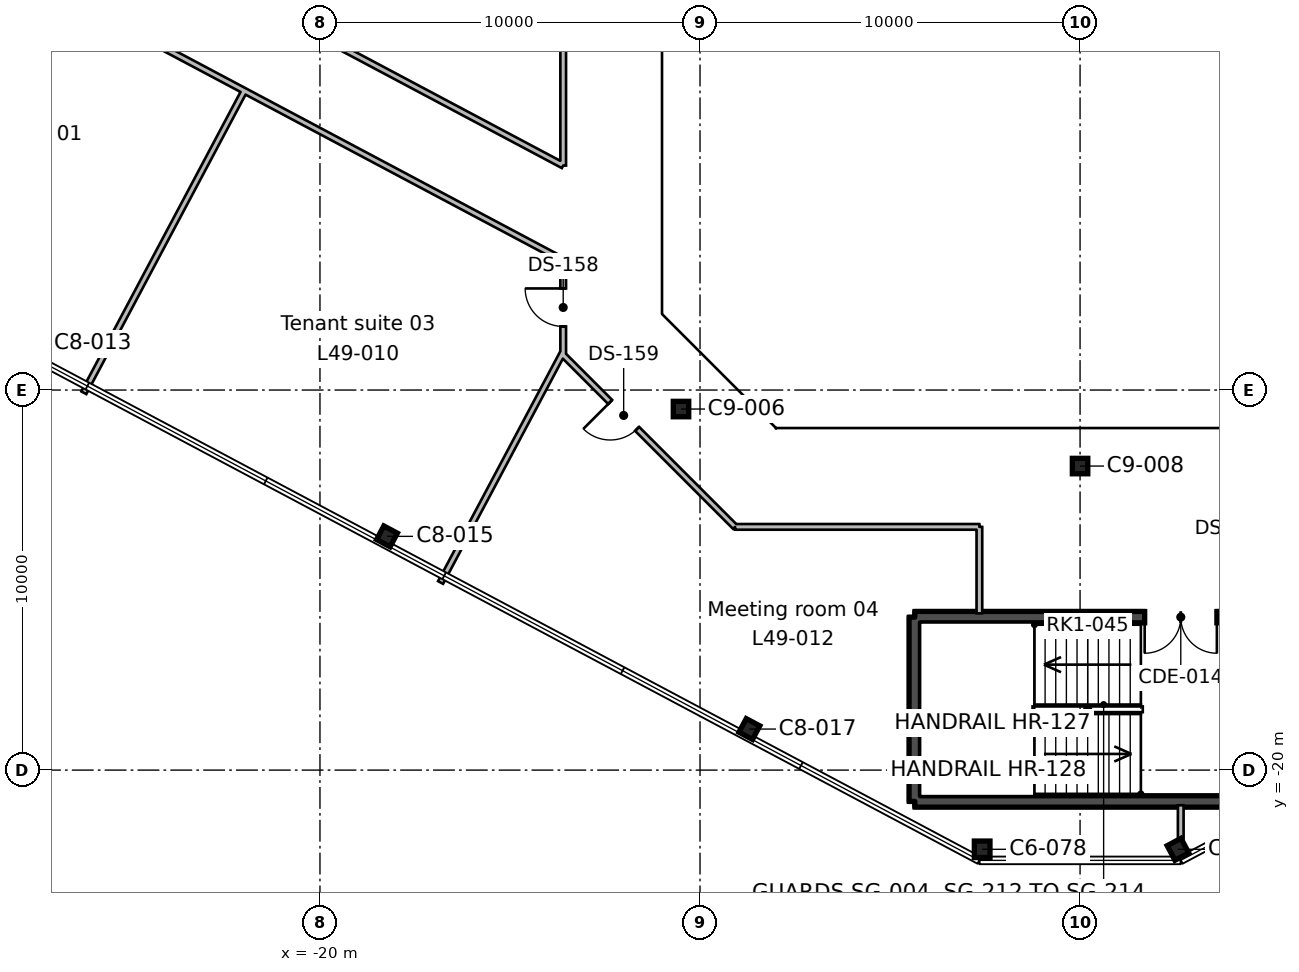
"""IFC4 building model, lengths in metres.
Left out: names, types, materials, properties, quantities, classifications, styles, units other than length and angle.
Written with IfcOpenShell. Run it as: python <this file> out.ifc"""

import sys

from ifc_helpers import new_model, si_unit, direction, frame, frame_2d, origin, origin_2d, place, context, subcontext, project, spatial, rectangle, hollow_rectangle, i_section, extrude, element, fill, save


model = new_model("IFC4")
c1 = context("Model", 3, precision=1e-05, world=origin(), true_north=direction((0.0, 1.0)))
c2 = subcontext(c1, "Body", "Model", "MODEL_VIEW")
j1 = project(units=[si_unit("LENGTHUNIT", "METRE"), si_unit("PLANEANGLEUNIT", "RADIAN")], contexts=[c1])
p1 = place(None, origin())
s1 = spatial("IfcSite", under=j1, at=p1, CompositionType="ELEMENT")
p2 = place(p1, origin())
s2 = spatial("IfcBuilding", under=s1, at=p2, CompositionType="ELEMENT")
p3 = place(p2, frame((0.0, 0.0, 224.7)))
s3 = spatial("IfcBuildingStorey", under=s2, at=p3, CompositionType="ELEMENT", Elevation=224.7)
for number, where, z_axis, x_axis in (
    (1, (-2.576, -22.084, 0.0), (0.0, 0.0, 1.0), (1.0, 0.0, 0.0)),
    (2, (2.576, -22.084, 0.0), (0.0, 0.0, 1.0), (0.883, 0.469, 0.0)),
):
    element("IfcColumn", number, at=place(p3, frame(where, z_axis=z_axis, x_axis=x_axis)), inside=s3, PredefinedType="COLUMN", context=c2, shape_type="SweptSolid", body=[
        extrude(i_section(OverallWidth=0.412, OverallDepth=0.434, WebThickness=0.036, FlangeThickness=0.057, FilletRadius=0.015, at=origin_2d()), origin(), (0.0, 0.0, 1.0), 3.9),
    ])
for number, where, z_axis, x_axis in (
    (3, (-8.701, -18.92, 0.0), (0.0, 0.0, 1.0), (0.883, -0.469, 0.0)),
    (4, (-18.237, -13.85, 0.0), (0.0, 0.0, 1.0), (0.883, -0.469, 0.0)),
):
    element("IfcColumn", number, at=place(p3, frame(where, z_axis=z_axis, x_axis=x_axis)), inside=s3, PredefinedType="COLUMN", context=c2, shape_type="SweptSolid", body=[
        extrude(i_section(OverallWidth=0.404, OverallDepth=0.406, WebThickness=0.027, FlangeThickness=0.044, FilletRadius=0.015, at=origin_2d()), origin(), (0.0, 0.0, 1.0), 3.9),
    ])
for number, where, z_axis, x_axis in (
    (5, (0.0, -12.0, 0.0), (0.0, 0.0, 1.0), (1.0, 0.0, 0.0)),
    (6, (-10.5, -10.5, 0.0), (0.0, 0.0, 1.0), (1.0, 0.0, 0.0)),
):
    element("IfcColumn", number, at=place(p3, frame(where, z_axis=z_axis, x_axis=x_axis)), inside=s3, PredefinedType="COLUMN", context=c2, shape_type="SweptSolid", body=[
        extrude(hollow_rectangle(XDim=0.406, YDim=0.406, WallThickness=0.015, InnerFilletRadius=0.007, OuterFilletRadius=0.022, at=origin_2d()), origin(), (0.0, 0.0, 1.0), 3.9),
    ])
p4 = place(p3, frame((3.95, -20.825, 0.0), z_axis=(0.0, 0.0, 1.0), x_axis=(-1.0, 0.0, 0.0)))
e7 = element("IfcWall", 7, at=p4, inside=s3, PredefinedType="SHEAR", context=c2, shape_type="SweptSolid", body=[
    extrude(rectangle(XDim=8.3, YDim=0.3, at=frame_2d((4.15, 0.0))), origin(), (0.0, 0.0, 1.0), 3.9),
])
p5 = place(p3, frame((-4.35, -20.825, 0.0), z_axis=(0.0, 0.0, 1.0), x_axis=(0.0, 1.0, 0.0)))
e8 = element("IfcWall", 8, at=p5, inside=s3, PredefinedType="SHEAR", context=c2, shape_type="SweptSolid", body=[
    extrude(rectangle(XDim=4.85, YDim=0.3, at=frame_2d((2.425, 0.0))), origin(), (0.0, 0.0, 1.0), 3.9),
])
p6 = place(p3, frame((-4.35, -15.975, 0.0), z_axis=(0.0, 0.0, 1.0), x_axis=(1.0, 0.0, 0.0)))
e9 = element("IfcWall", 9, at=p6, inside=s3, PredefinedType="SHEAR", context=c2, shape_type="SweptSolid", body=[
    extrude(rectangle(XDim=8.3, YDim=0.3, at=frame_2d((4.15, 0.0))), origin(), (0.0, 0.0, 1.0), 3.9),
])
p7 = place(p6, frame((6.05, 0.0, 0.0)))
e10 = element("IfcOpeningElement", 10, at=p7, cuts=e9, PredefinedType="OPENING", context=c2, shape_type="SweptSolid", body=[
    extrude(rectangle(XDim=1.9, YDim=2.1, at=frame_2d((0.95, 1.05))), frame((0.0, 0.16, 0.0), z_axis=(0.0, -1.0, 0.0), x_axis=(1.0, 0.0, 0.0)), (0.0, 0.0, 1.0), 0.32),
])
p8 = place(p3, frame((-13.6, -9.077, 0.0), z_axis=(0.0, 0.0, 1.0), x_axis=(0.0, 1.0, 0.0)))
e11 = element("IfcWall", 11, at=p8, inside=s3, PredefinedType="PARTITIONING", context=c2, shape_type="SweptSolid", body=[
    extrude(rectangle(XDim=2.491, YDim=0.15, at=frame_2d((1.246, 0.0))), origin(), (0.0, 0.0, 1.0), 3.54),
])
p9 = place(p8, frame((0.75, 0.0, 0.0)))
e12 = element("IfcOpeningElement", 12, at=p9, cuts=e11, PredefinedType="OPENING", context=c2, shape_type="SweptSolid", body=[
    extrude(rectangle(XDim=1.0, YDim=2.1, at=frame_2d((0.5, 1.05))), frame((0.0, 0.085, 0.0), z_axis=(0.0, -1.0, 0.0), x_axis=(1.0, 0.0, 0.0)), (0.0, 0.0, 1.0), 0.17),
])
p10 = place(p3, frame((-13.6, -6.586, 0.0), z_axis=(0.0, 0.0, 1.0), x_axis=(-0.882948083203, 0.469470640582, 0.0)))
e13 = element("IfcWall", 13, at=p10, inside=s3, PredefinedType="PARTITIONING", context=c2, shape_type="SweptSolid", body=[
    extrude(rectangle(XDim=36.556, YDim=0.15, at=frame_2d((18.278, 0.0))), origin(), (0.0, 0.0, 1.0), 3.54),
])
p11 = place(p10, frame((34.25, 0.0, 0.0)))
e14 = element("IfcOpeningElement", 14, at=p11, cuts=e13, PredefinedType="OPENING", context=c2, shape_type="SweptSolid", body=[
    extrude(rectangle(XDim=1.0, YDim=2.1, at=frame_2d((0.5, 1.05))), frame((0.0, 0.085, 0.0), z_axis=(0.0, -1.0, 0.0), x_axis=(1.0, 0.0, 0.0)), (0.0, 0.0, 1.0), 0.17),
])
p12 = place(p10, frame((25.65, 0.0, 0.0)))
e15 = element("IfcOpeningElement", 15, at=p12, cuts=e13, PredefinedType="OPENING", context=c2, shape_type="SweptSolid", body=[
    extrude(rectangle(XDim=1.0, YDim=2.1, at=frame_2d((0.5, 1.05))), frame((0.0, 0.085, 0.0), z_axis=(0.0, -1.0, 0.0), x_axis=(1.0, 0.0, 0.0)), (0.0, 0.0, 1.0), 0.17),
])
p13 = place(p10, frame((17.75, 0.0, 0.0)))
e16 = element("IfcOpeningElement", 16, at=p13, cuts=e13, PredefinedType="OPENING", context=c2, shape_type="SweptSolid", body=[
    extrude(rectangle(XDim=1.0, YDim=2.1, at=frame_2d((0.5, 1.05))), frame((0.0, 0.085, 0.0), z_axis=(0.0, -1.0, 0.0), x_axis=(1.0, 0.0, 0.0)), (0.0, 0.0, 1.0), 0.17),
])
p14 = place(p3, frame((-21.989, -2.126, 0.0), z_axis=(0.0, 0.0, 1.0), x_axis=(-0.469481145989, -0.882942497313, 0.0)))
e17 = element("IfcWall", 17, at=p14, inside=s3, PredefinedType="PARTITIONING", context=c2, shape_type="SweptSolid", body=[
    extrude(rectangle(XDim=9.0, YDim=0.15, at=frame_2d((4.5, 0.0))), origin(), (0.0, 0.0, 1.0), 3.54),
])
p15 = place(p3, frame((-13.6, -8.998, 0.0), z_axis=(0.0, 0.0, 1.0), x_axis=(-0.469531053644, -0.882915958438, 0.0)))
e18 = element("IfcWall", 18, at=p15, inside=s3, PredefinedType="PARTITIONING", context=c2, shape_type="SweptSolid", body=[
    extrude(rectangle(XDim=6.87, YDim=0.15, at=frame_2d((3.435, 0.0))), origin(), (0.0, 0.0, 1.0), 3.54),
])
p16 = place(p3, frame((-13.6, -9.077, 0.0), z_axis=(0.0, 0.0, 1.0), x_axis=(0.707106781187, -0.707106781187, 0.0)))
e19 = element("IfcWall", 19, at=p16, inside=s3, PredefinedType="PARTITIONING", context=c2, shape_type="SweptSolid", body=[
    extrude(rectangle(XDim=6.397, YDim=0.15, at=frame_2d((3.198, 0.0))), origin(), (0.0, 0.0, 1.0), 3.54),
])
p17 = place(p16, frame((1.75, 0.0, 0.0)))
e20 = element("IfcOpeningElement", 20, at=p17, cuts=e19, PredefinedType="OPENING", context=c2, shape_type="SweptSolid", body=[
    extrude(rectangle(XDim=1.0, YDim=2.1, at=frame_2d((0.5, 1.05))), frame((0.0, 0.085, 0.0), z_axis=(0.0, -1.0, 0.0), x_axis=(1.0, 0.0, 0.0)), (0.0, 0.0, 1.0), 0.17),
])
p18 = place(p3, frame((-2.649, -15.875, 0.0), z_axis=(0.0, 0.0, 1.0), x_axis=(0.0, 1.0, 0.0)))
e21 = element("IfcWall", 21, at=p18, inside=s3, PredefinedType="PARTITIONING", context=c2, shape_type="SweptSolid", body=[
    extrude(rectangle(XDim=2.275, YDim=0.15, at=frame_2d((1.137, 0.0))), origin(), (0.0, 0.0, 1.0), 3.54),
])
p19 = place(p3, frame((-2.649, -13.6, 0.0), z_axis=(0.0, 0.0, 1.0), x_axis=(-1.0, 0.0, 0.0)))
e22 = element("IfcWall", 22, at=p19, inside=s3, PredefinedType="PARTITIONING", context=c2, shape_type="SweptSolid", body=[
    extrude(rectangle(XDim=6.428, YDim=0.15, at=frame_2d((3.214, 0.0))), origin(), (0.0, 0.0, 1.0), 3.54),
])
p20 = place(p3, frame((2.649, -21.799, 0.0), z_axis=(0.0, 0.0, 1.0), x_axis=(0.0, 1.0, 0.0)))
e23 = element("IfcWall", 23, at=p20, inside=s3, PredefinedType="PARTITIONING", context=c2, shape_type="SweptSolid", body=[
    extrude(rectangle(XDim=0.874, YDim=0.15, at=frame_2d((0.437, 0.0))), origin(), (0.0, 0.0, 1.0), 3.54),
])
p21 = place(p3, frame((-13.6, 9.077, 0.0), z_axis=(0.0, 0.0, 1.0), x_axis=(0.0, -1.0, 0.0)))
e24 = element("IfcWall", 24, at=p21, inside=s3, PredefinedType="PARTITIONING", context=c2, shape_type="SweptSolid", body=[
    extrude(rectangle(XDim=13.171, YDim=0.15, at=frame_2d((6.585, 0.0))), origin(), (0.0, 0.0, 1.0), 3.54),
])
p22 = place(p3, frame((-13.6, -4.094, 0.0), z_axis=(0.0, 0.0, 1.0), x_axis=(-0.882961998231, 0.469444469218, 0.0)))
e25 = element("IfcWall", 25, at=p22, inside=s3, PredefinedType="PARTITIONING", context=c2, shape_type="SweptSolid", body=[
    extrude(rectangle(XDim=7.714, YDim=0.15, at=frame_2d((3.857, 0.0))), origin(), (0.0, 0.0, 1.0), 3.54),
])
p23 = place(p7, frame((1.9, 0.0, 0.0), z_axis=(0.0, 0.0, 1.0), x_axis=(-1.0, 0.0, 0.0)))
e26 = element("IfcDoor", 26, at=p23, inside=s3, OperationType="DOUBLE_DOOR_SINGLE_SWING", PredefinedType="DOOR", context=c2, shape_type="SweptSolid", body=[
    extrude(rectangle(XDim=1.9, YDim=2.1, at=frame_2d((0.95, 1.05))), frame((0.0, 0.025, 0.0), z_axis=(0.0, -1.0, 0.0), x_axis=(1.0, 0.0, 0.0)), (0.0, 0.0, 1.0), 0.05),
])
fill(e10, e26)
p24 = place(p9, origin())
e27 = element("IfcDoor", 27, at=p24, inside=s3, OperationType="SINGLE_SWING_RIGHT", PredefinedType="DOOR", context=c2, shape_type="SweptSolid", body=[
    extrude(rectangle(XDim=1.0, YDim=2.1, at=frame_2d((0.5, 1.05))), frame((0.0, 0.025, 0.0), z_axis=(0.0, -1.0, 0.0), x_axis=(1.0, 0.0, 0.0)), (0.0, 0.0, 1.0), 0.05),
])
fill(e12, e27)
p25 = place(p17, frame((1.0, 0.0, 0.0), z_axis=(0.0, 0.0, 1.0), x_axis=(-1.0, 0.0, 0.0)))
e28 = element("IfcDoor", 28, at=p25, inside=s3, OperationType="SINGLE_SWING_RIGHT", PredefinedType="DOOR", context=c2, shape_type="SweptSolid", body=[
    extrude(rectangle(XDim=1.0, YDim=2.1, at=frame_2d((0.5, 1.05))), frame((0.0, 0.025, 0.0), z_axis=(0.0, -1.0, 0.0), x_axis=(1.0, 0.0, 0.0)), (0.0, 0.0, 1.0), 0.05),
])
fill(e20, e28)
save(model, sys.argv[1])
